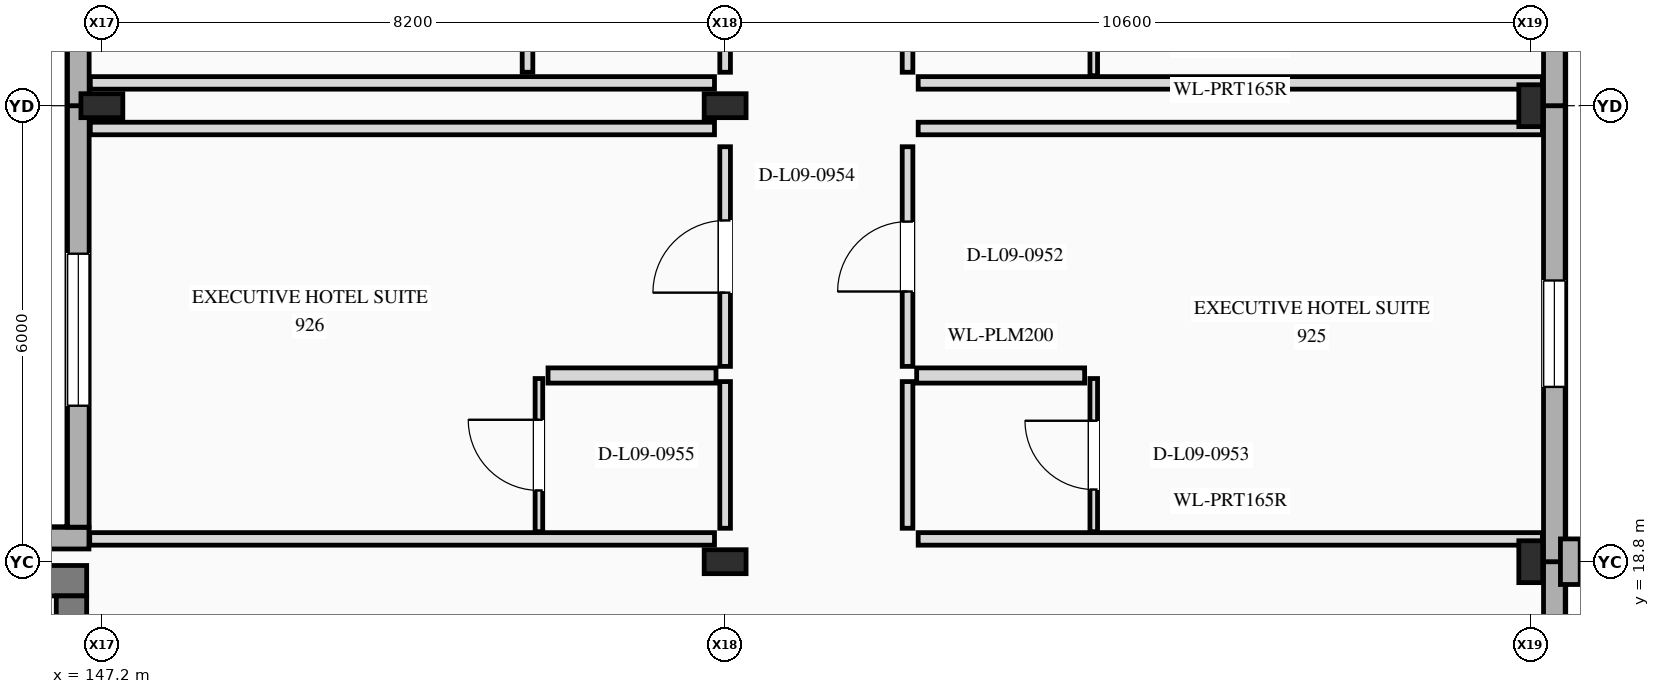
"""IFC4 building model, lengths in metres.
Left out: names, types, materials, properties, quantities, classifications, styles, units other than length and angle.
Written with IfcOpenShell. Run it as: python <this file> out.ifc"""

import sys

from ifc_helpers import new_model, si_unit, direction, frame, frame_2d, origin, origin_2d, place, context, subcontext, project, spatial, rectangle, i_section, extrude, element, fill, save


model = new_model("IFC4")
c1 = context("Model", 3, precision=1e-05, world=origin(), true_north=direction((0.0, 1.0)))
c2 = subcontext(c1, "Body", "Model", "MODEL_VIEW")
j1 = project(units=[si_unit("LENGTHUNIT", "METRE"), si_unit("PLANEANGLEUNIT", "RADIAN")], contexts=[c1])
p1 = place(None, origin())
s1 = spatial("IfcSite", under=j1, at=p1, CompositionType="ELEMENT")
p2 = place(p1, origin())
s2 = spatial("IfcBuilding", under=s1, at=p2, CompositionType="ELEMENT")
p3 = place(p2, frame((0.0, 0.0, 37.6)))
s3 = spatial("IfcBuildingStorey", under=s2, at=p3, CompositionType="ELEMENT", Elevation=37.6)
for number, where, z_axis, x_axis in (
    (1, (147.2, 24.8, 0.0), (0.0, 0.0, 1.0), (0.0, 1.0, 0.0)),
    (2, (155.4, 18.8, 0.0), (0.0, 0.0, 1.0), (0.0, 1.0, 0.0)),
    (3, (155.4, 24.8, 0.0), (0.0, 0.0, 1.0), (0.0, 1.0, 0.0)),
    (4, (166.0, 18.8, 0.0), (0.0, 0.0, 1.0), (1.0, 0.0, 0.0)),
    (5, (166.0, 24.8, 0.0), (0.0, 0.0, 1.0), (1.0, 0.0, 0.0)),
):
    element("IfcColumn", number, at=place(p3, frame(where, z_axis=z_axis, x_axis=x_axis)), inside=s3, PredefinedType="COLUMN", context=c2, shape_type="SweptSolid", body=[
        extrude(i_section(OverallWidth=0.315, OverallDepth=0.551, WebThickness=0.015, FlangeThickness=0.024, at=origin_2d()), origin(), (0.0, 0.0, 1.0), 3.5),
    ])
p4 = place(p3, frame((166.31, 8.2, 0.0), z_axis=(0.0, 0.0, 1.0), x_axis=(0.0, 1.0, 0.0)))
e6 = element("IfcWall", 6, at=p4, inside=s3, PredefinedType="STANDARD", context=c2, shape_type="SweptSolid", body=[
    extrude(rectangle(XDim=10.6, YDim=0.285, at=frame_2d((5.3, 0.0))), origin(), (0.0, 0.0, 1.0), 3.5),
])
p5 = place(p4, frame((4.55, 0.0, 0.88)))
e7 = element("IfcOpeningElement", 7, at=p5, cuts=e6, PredefinedType="OPENING", context=c2, shape_type="SweptSolid", body=[
    extrude(rectangle(XDim=1.5, YDim=1.7, at=frame_2d((0.75, 0.85))), frame((0.0, 0.152, 0.0), z_axis=(0.0, -1.0, 0.0), x_axis=(1.0, 0.0, 0.0)), (0.0, 0.0, 1.0), 0.305),
])
p6 = place(p3, frame((166.31, 18.8, 0.0), z_axis=(0.0, 0.0, 1.0), x_axis=(0.0, 1.0, 0.0)))
e8 = element("IfcWall", 8, at=p6, inside=s3, PredefinedType="STANDARD", context=c2, shape_type="SweptSolid", body=[
    extrude(rectangle(XDim=6.0, YDim=0.285, at=frame_2d((3.0, 0.0))), origin(), (0.0, 0.0, 1.0), 3.5),
])
p7 = place(p6, frame((2.3, 0.0, 0.85)))
e9 = element("IfcOpeningElement", 9, at=p7, cuts=e8, PredefinedType="OPENING", context=c2, shape_type="SweptSolid", body=[
    extrude(rectangle(XDim=1.4, YDim=1.55, at=frame_2d((0.7, 0.775))), frame((0.0, 0.152, 0.0), z_axis=(0.0, -1.0, 0.0), x_axis=(1.0, 0.0, 0.0)), (0.0, 0.0, 1.0), 0.305),
])
p8 = place(p3, frame((166.52, 18.5, 0.0), z_axis=(0.0, 0.0, 1.0), x_axis=(0.0, 1.0, 0.0)))
e10 = element("IfcWall", 10, at=p8, inside=s3, PredefinedType="ELEMENTEDWALL", context=c2, shape_type="SweptSolid", body=[
    extrude(rectangle(XDim=0.6, YDim=0.26, at=frame_2d((0.3, 0.0))), origin(), (0.0, 0.0, 1.0), 3.5),
])
p9 = place(p3, frame((166.31, 24.8, 0.0), z_axis=(0.0, 0.0, 1.0), x_axis=(0.0, 1.0, 0.0)))
e11 = element("IfcWall", 11, at=p9, inside=s3, PredefinedType="STANDARD", context=c2, shape_type="SweptSolid", body=[
    extrude(rectangle(XDim=1.34, YDim=0.285, at=frame_2d((0.67, 0.0))), origin(), (0.0, 0.0, 1.0), 3.5),
])
p10 = place(p3, frame((147.03, 19.11, 0.0), z_axis=(0.0, 0.0, 1.0), x_axis=(-1.0, 0.0, 0.0)))
e12 = element("IfcWall", 12, at=p10, inside=s3, PredefinedType="STANDARD", context=c2, shape_type="SweptSolid", body=[
    extrude(rectangle(XDim=11.03, YDim=0.285, at=frame_2d((5.515, 0.0))), origin(), (0.0, 0.0, 1.0), 3.5),
])
p11 = place(p3, frame((146.89, 19.254, 0.0), z_axis=(0.0, 0.0, 1.0), x_axis=(0.0, 1.0, 0.0)))
e13 = element("IfcWall", 13, at=p11, inside=s3, PredefinedType="STANDARD", context=c2, shape_type="SweptSolid", body=[
    extrude(rectangle(XDim=5.546, YDim=0.285, at=frame_2d((2.773, 0.0))), origin(), (0.0, 0.0, 1.0), 3.5),
])
p12 = place(p11, frame((1.598, 0.0, 0.85)))
e14 = element("IfcOpeningElement", 14, at=p12, cuts=e13, PredefinedType="OPENING", context=c2, shape_type="SweptSolid", body=[
    extrude(rectangle(XDim=2.0, YDim=1.65, at=frame_2d((1.0, 0.825))), frame((0.0, 0.152, 0.0), z_axis=(0.0, -1.0, 0.0), x_axis=(1.0, 0.0, 0.0)), (0.0, 0.0, 1.0), 0.305),
])
p13 = place(p3, frame((146.89, 24.8, 0.0), z_axis=(0.0, 0.0, 1.0), x_axis=(0.0, 1.0, 0.0)))
e15 = element("IfcWall", 15, at=p13, inside=s3, PredefinedType="STANDARD", context=c2, shape_type="SweptSolid", body=[
    extrude(rectangle(XDim=8.4, YDim=0.285, at=frame_2d((4.2, 0.0))), origin(), (0.0, 0.0, 1.0), 3.5),
])
p14 = place(p13, frame((3.2, 0.0, 0.85)))
e16 = element("IfcOpeningElement", 16, at=p14, cuts=e15, PredefinedType="OPENING", context=c2, shape_type="SweptSolid", body=[
    extrude(rectangle(XDim=2.0, YDim=1.65, at=frame_2d((1.0, 0.825))), frame((0.0, 0.152, 0.0), z_axis=(0.0, -1.0, 0.0), x_axis=(1.0, 0.0, 0.0)), (0.0, 0.0, 1.0), 0.305),
])
p15 = place(p3, frame((147.0, 18.55, 0.0), z_axis=(0.0, 0.0, 1.0), x_axis=(-1.0, 0.0, 0.0)))
e17 = element("IfcWall", 17, at=p15, inside=s3, PredefinedType="SHEAR", context=c2, shape_type="SweptSolid", body=[
    extrude(rectangle(XDim=10.6, YDim=0.4, at=frame_2d((5.3, 0.0))), origin(), (0.0, 0.0, 1.0), 3.5),
])
p16 = place(p3, frame((146.8, 11.0, 0.0), z_axis=(0.0, 0.0, 1.0), x_axis=(0.0, 1.0, 0.0)))
e18 = element("IfcWall", 18, at=p16, inside=s3, PredefinedType="SHEAR", context=c2, shape_type="SweptSolid", body=[
    extrude(rectangle(XDim=7.35, YDim=0.4, at=frame_2d((3.675, 0.0))), origin(), (0.0, 0.0, 1.0), 3.5),
])
p17 = place(p16, frame((5.0, 0.0, 0.0)))
e19 = element("IfcOpeningElement", 19, at=p17, cuts=e18, PredefinedType="OPENING", context=c2, shape_type="SweptSolid", body=[
    extrude(rectangle(XDim=0.95, YDim=2.2, at=frame_2d((0.475, 1.1))), frame((0.0, 0.21, 0.0), z_axis=(0.0, -1.0, 0.0), x_axis=(1.0, 0.0, 0.0)), (0.0, 0.0, 1.0), 0.42),
])
p18 = place(p16, frame((0.175, 0.0, 0.0)))
e20 = element("IfcOpeningElement", 20, at=p18, cuts=e18, PredefinedType="OPENING", context=c2, shape_type="SweptSolid", body=[
    extrude(rectangle(XDim=1.15, YDim=2.25, at=frame_2d((0.575, 1.125))), frame((0.0, 0.21, 0.0), z_axis=(0.0, -1.0, 0.0), x_axis=(1.0, 0.0, 0.0)), (0.0, 0.0, 1.0), 0.42),
])
p19 = place(p16, frame((1.875, 0.0, 0.0)))
e21 = element("IfcOpeningElement", 21, at=p19, cuts=e18, PredefinedType="OPENING", context=c2, shape_type="SweptSolid", body=[
    extrude(rectangle(XDim=1.15, YDim=2.25, at=frame_2d((0.575, 1.125))), frame((0.0, 0.21, 0.0), z_axis=(0.0, -1.0, 0.0), x_axis=(1.0, 0.0, 0.0)), (0.0, 0.0, 1.0), 0.42),
])
p20 = place(p3, frame((157.8, 19.24, 0.0), z_axis=(0.0, 0.0, 1.0), x_axis=(0.0, 1.0, 0.0)))
e22 = element("IfcWall", 22, at=p20, inside=s3, PredefinedType="PARTITIONING", context=c2, shape_type="SweptSolid", body=[
    extrude(rectangle(XDim=1.93, YDim=0.14, at=frame_2d((0.965, 0.0))), origin(), (0.0, 0.0, 1.0), 2.758),
])
p21 = place(p3, frame((157.8, 21.37, 0.0), z_axis=(0.0, 0.0, 1.0), x_axis=(0.0, 1.0, 0.0)))
e23 = element("IfcWall", 23, at=p21, inside=s3, PredefinedType="PARTITIONING", context=c2, shape_type="SweptSolid", body=[
    extrude(rectangle(XDim=2.89, YDim=0.14, at=frame_2d((1.445, 0.0))), origin(), (0.0, 0.0, 1.0), 2.758),
])
p22 = place(p21, frame((0.985, 0.0, 0.0)))
e24 = element("IfcOpeningElement", 24, at=p22, cuts=e23, PredefinedType="OPENING", context=c2, shape_type="SweptSolid", body=[
    extrude(rectangle(XDim=0.92, YDim=2.15, at=frame_2d((0.46, 1.075))), frame((0.0, 0.08, 0.0), z_axis=(0.0, -1.0, 0.0), x_axis=(1.0, 0.0, 0.0)), (0.0, 0.0, 1.0), 0.16),
])
for number, where, z_axis, x_axis in (
    (25, (157.94, 19.1, 0.0), (0.0, 0.0, 1.0), (1.0, 0.0, 0.0)),
    (26, (157.94, 24.5, 0.0), (0.0, 0.0, 1.0), (1.0, 0.0, 0.0)),
):
    element("IfcWall", number, at=place(p3, frame(where, z_axis=z_axis, x_axis=x_axis)), inside=s3, PredefinedType="PARTITIONING", context=c2, shape_type="SweptSolid", body=[
        extrude(rectangle(XDim=8.213, YDim=0.165, at=frame_2d((4.106, 0.0))), origin(), (0.0, 0.0, 1.0), 2.59),
    ])
p23 = place(p3, frame((157.92, 21.25, 0.0), z_axis=(0.0, 0.0, 1.0), x_axis=(1.0, 0.0, 0.0)))
e27 = element("IfcWall", 27, at=p23, inside=s3, PredefinedType="PLUMBINGWALL", context=c2, shape_type="SweptSolid", body=[
    extrude(rectangle(XDim=2.21, YDim=0.2, at=frame_2d((1.105, 0.0))), origin(), (0.0, 0.0, 1.0), 3.2),
])
p24 = place(p3, frame((160.25, 19.195, 0.0), z_axis=(0.0, 0.0, 1.0), x_axis=(0.0, 1.0, 0.0)))
e28 = element("IfcWall", 28, at=p24, inside=s3, PredefinedType="PARTITIONING", context=c2, shape_type="SweptSolid", body=[
    extrude(rectangle(XDim=2.015, YDim=0.1, at=frame_2d((1.008, 0.0))), origin(), (0.0, 0.0, 1.0), 2.758),
])
p25 = place(p24, frame((0.555, 0.0, 0.0)))
e29 = element("IfcOpeningElement", 29, at=p25, cuts=e28, PredefinedType="OPENING", context=c2, shape_type="SweptSolid", body=[
    extrude(rectangle(XDim=0.905, YDim=2.1, at=frame_2d((0.453, 1.05))), frame((0.0, 0.06, 0.0), z_axis=(0.0, -1.0, 0.0), x_axis=(1.0, 0.0, 0.0)), (0.0, 0.0, 1.0), 0.12),
])
p26 = place(p3, frame((155.4, 19.24, 0.0), z_axis=(0.0, 0.0, 1.0), x_axis=(0.0, 1.0, 0.0)))
e30 = element("IfcWall", 30, at=p26, inside=s3, PredefinedType="PARTITIONING", context=c2, shape_type="SweptSolid", body=[
    extrude(rectangle(XDim=1.93, YDim=0.14, at=frame_2d((0.965, 0.0))), origin(), (0.0, 0.0, 1.0), 2.674),
])
p27 = place(p3, frame((155.4, 21.37, 0.0), z_axis=(0.0, 0.0, 1.0), x_axis=(0.0, 1.0, 0.0)))
e31 = element("IfcWall", 31, at=p27, inside=s3, PredefinedType="PARTITIONING", context=c2, shape_type="SweptSolid", body=[
    extrude(rectangle(XDim=2.89, YDim=0.14, at=frame_2d((1.445, 0.0))), origin(), (0.0, 0.0, 1.0), 2.674),
])
p28 = place(p27, frame((0.97, 0.0, 0.0)))
e32 = element("IfcOpeningElement", 32, at=p28, cuts=e31, PredefinedType="OPENING", context=c2, shape_type="SweptSolid", body=[
    extrude(rectangle(XDim=0.95, YDim=2.15, at=frame_2d((0.475, 1.075))), frame((0.0, 0.08, 0.0), z_axis=(0.0, -1.0, 0.0), x_axis=(1.0, 0.0, 0.0)), (0.0, 0.0, 1.0), 0.16),
])
p29 = place(p3, frame((147.04, 19.1, 0.0), z_axis=(0.0, 0.0, 1.0), x_axis=(1.0, 0.0, 0.0)))
e33 = element("IfcWall", 33, at=p29, inside=s3, PredefinedType="PARTITIONING", context=c2, shape_type="SweptSolid", body=[
    extrude(rectangle(XDim=8.22, YDim=0.165, at=frame_2d((4.11, 0.0))), origin(), (0.0, 0.0, 1.0), 3.2),
])
p30 = place(p3, frame((147.048, 24.5, 0.0), z_axis=(0.0, 0.0, 1.0), x_axis=(1.0, 0.0, 0.0)))
e34 = element("IfcWall", 34, at=p30, inside=s3, PredefinedType="PARTITIONING", context=c2, shape_type="SweptSolid", body=[
    extrude(rectangle(XDim=8.212, YDim=0.165, at=frame_2d((4.106, 0.0))), origin(), (0.0, 0.0, 1.0), 2.613),
])
p31 = place(p3, frame((153.07, 21.25, 0.0), z_axis=(0.0, 0.0, 1.0), x_axis=(1.0, 0.0, 0.0)))
e35 = element("IfcWall", 35, at=p31, inside=s3, PredefinedType="PLUMBINGWALL", context=c2, shape_type="SweptSolid", body=[
    extrude(rectangle(XDim=2.21, YDim=0.2, at=frame_2d((1.105, 0.0))), origin(), (0.0, 0.0, 1.0), 3.2),
])
p32 = place(p3, frame((152.95, 19.195, 0.0), z_axis=(0.0, 0.0, 1.0), x_axis=(0.0, 1.0, 0.0)))
e36 = element("IfcWall", 36, at=p32, inside=s3, PredefinedType="PARTITIONING", context=c2, shape_type="SweptSolid", body=[
    extrude(rectangle(XDim=2.015, YDim=0.1, at=frame_2d((1.008, 0.0))), origin(), (0.0, 0.0, 1.0), 3.2),
])
p33 = place(p32, frame((0.543, 0.0, 0.0)))
e37 = element("IfcOpeningElement", 37, at=p33, cuts=e36, PredefinedType="OPENING", context=c2, shape_type="SweptSolid", body=[
    extrude(rectangle(XDim=0.93, YDim=2.14, at=frame_2d((0.465, 1.07))), frame((0.0, 0.06, 0.0), z_axis=(0.0, -1.0, 0.0), x_axis=(1.0, 0.0, 0.0)), (0.0, 0.0, 1.0), 0.12),
])
p34 = place(p3, frame((157.8, 25.24, 0.0), z_axis=(0.0, 0.0, 1.0), x_axis=(0.0, 1.0, 0.0)))
e38 = element("IfcWall", 38, at=p34, inside=s3, PredefinedType="PARTITIONING", context=c2, shape_type="SweptSolid", body=[
    extrude(rectangle(XDim=1.93, YDim=0.14, at=frame_2d((0.965, 0.0))), origin(), (0.0, 0.0, 1.0), 2.758),
])
p35 = place(p3, frame((157.94, 25.1, 0.0), z_axis=(0.0, 0.0, 1.0), x_axis=(1.0, 0.0, 0.0)))
e39 = element("IfcWall", 39, at=p35, inside=s3, PredefinedType="PARTITIONING", context=c2, shape_type="SweptSolid", body=[
    extrude(rectangle(XDim=8.213, YDim=0.165, at=frame_2d((4.106, 0.0))), origin(), (0.0, 0.0, 1.0), 2.59),
])
p36 = place(p3, frame((160.25, 25.195, 0.0), z_axis=(0.0, 0.0, 1.0), x_axis=(0.0, 1.0, 0.0)))
e40 = element("IfcWall", 40, at=p36, inside=s3, PredefinedType="PARTITIONING", context=c2, shape_type="SweptSolid", body=[
    extrude(rectangle(XDim=2.015, YDim=0.1, at=frame_2d((1.008, 0.0))), origin(), (0.0, 0.0, 1.0), 2.758),
])
p37 = place(p36, frame((0.53, 0.0, 0.0)))
e41 = element("IfcOpeningElement", 41, at=p37, cuts=e40, PredefinedType="OPENING", context=c2, shape_type="SweptSolid", body=[
    extrude(rectangle(XDim=0.955, YDim=2.14, at=frame_2d((0.478, 1.07))), frame((0.0, 0.06, 0.0), z_axis=(0.0, -1.0, 0.0), x_axis=(1.0, 0.0, 0.0)), (0.0, 0.0, 1.0), 0.12),
])
p38 = place(p3, frame((155.4, 25.24, 0.0), z_axis=(0.0, 0.0, 1.0), x_axis=(0.0, 1.0, 0.0)))
e42 = element("IfcWall", 42, at=p38, inside=s3, PredefinedType="PARTITIONING", context=c2, shape_type="SweptSolid", body=[
    extrude(rectangle(XDim=2.28, YDim=0.14, at=frame_2d((1.14, 0.0))), origin(), (0.0, 0.0, 1.0), 2.674),
])
p39 = place(p38, frame((0.66, 0.0, 0.0)))
e43 = element("IfcOpeningElement", 43, at=p39, cuts=e42, PredefinedType="OPENING", context=c2, shape_type="SweptSolid", body=[
    extrude(rectangle(XDim=0.96, YDim=2.15, at=frame_2d((0.48, 1.075))), frame((0.0, 0.08, 0.0), z_axis=(0.0, -1.0, 0.0), x_axis=(1.0, 0.0, 0.0)), (0.0, 0.0, 1.0), 0.16),
])
p40 = place(p3, frame((152.8, 25.24, 0.0), z_axis=(0.0, 0.0, 1.0), x_axis=(0.0, 1.0, 0.0)))
e44 = element("IfcWall", 44, at=p40, inside=s3, PredefinedType="PARTITIONING", context=c2, shape_type="SweptSolid", body=[
    extrude(rectangle(XDim=2.22, YDim=0.14, at=frame_2d((1.11, 0.0))), origin(), (0.0, 0.0, 1.0), 2.808),
])
p41 = place(p3, frame((147.048, 25.1, 0.0), z_axis=(0.0, 0.0, 1.0), x_axis=(1.0, 0.0, 0.0)))
e45 = element("IfcWall", 45, at=p41, inside=s3, PredefinedType="PARTITIONING", context=c2, shape_type="SweptSolid", body=[
    extrude(rectangle(XDim=8.212, YDim=0.165, at=frame_2d((4.106, 0.0))), origin(), (0.0, 0.0, 1.0), 2.613),
])
p42 = place(p7, origin())
e46 = element("IfcWindow", 46, at=p42, inside=s3, PartitioningType="SINGLE_PANEL", PredefinedType="WINDOW", context=c2, shape_type="SweptSolid", body=[
    extrude(rectangle(XDim=1.4, YDim=1.55, at=frame_2d((0.7, 0.775))), frame((0.0, 0.03, 0.0), z_axis=(0.0, -1.0, 0.0), x_axis=(1.0, 0.0, 0.0)), (0.0, 0.0, 1.0), 0.06),
])
fill(e9, e46)
p43 = place(p12, origin())
e47 = element("IfcWindow", 47, at=p43, inside=s3, PartitioningType="SINGLE_PANEL", PredefinedType="WINDOW", context=c2, shape_type="SweptSolid", body=[
    extrude(rectangle(XDim=2.0, YDim=1.65, at=frame_2d((1.0, 0.825))), frame((0.0, 0.03, 0.0), z_axis=(0.0, -1.0, 0.0), x_axis=(1.0, 0.0, 0.0)), (0.0, 0.0, 1.0), 0.06),
])
fill(e14, e47)
p44 = place(p22, origin())
e48 = element("IfcDoor", 48, at=p44, inside=s3, OperationType="SINGLE_SWING_LEFT", PredefinedType="DOOR", context=c2, shape_type="SweptSolid", body=[
    extrude(rectangle(XDim=0.92, YDim=2.15, at=frame_2d((0.46, 1.075))), frame((0.0, 0.025, 0.0), z_axis=(0.0, -1.0, 0.0), x_axis=(1.0, 0.0, 0.0)), (0.0, 0.0, 1.0), 0.05),
])
fill(e24, e48)
p45 = place(p25, origin())
e49 = element("IfcDoor", 49, at=p45, inside=s3, OperationType="SINGLE_SWING_RIGHT", PredefinedType="DOOR", context=c2, shape_type="SweptSolid", body=[
    extrude(rectangle(XDim=0.905, YDim=2.1, at=frame_2d((0.453, 1.05))), frame((0.0, 0.025, 0.0), z_axis=(0.0, -1.0, 0.0), x_axis=(1.0, 0.0, 0.0)), (0.0, 0.0, 1.0), 0.05),
])
fill(e29, e49)
p46 = place(p28, origin())
e50 = element("IfcDoor", 50, at=p46, inside=s3, OperationType="SINGLE_SWING_LEFT", PredefinedType="DOOR", context=c2, shape_type="SweptSolid", body=[
    extrude(rectangle(XDim=0.95, YDim=2.15, at=frame_2d((0.475, 1.075))), frame((0.0, 0.025, 0.0), z_axis=(0.0, -1.0, 0.0), x_axis=(1.0, 0.0, 0.0)), (0.0, 0.0, 1.0), 0.05),
])
fill(e32, e50)
p47 = place(p33, origin())
e51 = element("IfcDoor", 51, at=p47, inside=s3, OperationType="SINGLE_SWING_RIGHT", PredefinedType="DOOR", context=c2, shape_type="SweptSolid", body=[
    extrude(rectangle(XDim=0.93, YDim=2.14, at=frame_2d((0.465, 1.07))), frame((0.0, 0.025, 0.0), z_axis=(0.0, -1.0, 0.0), x_axis=(1.0, 0.0, 0.0)), (0.0, 0.0, 1.0), 0.05),
])
fill(e37, e51)
save(model, sys.argv[1])
